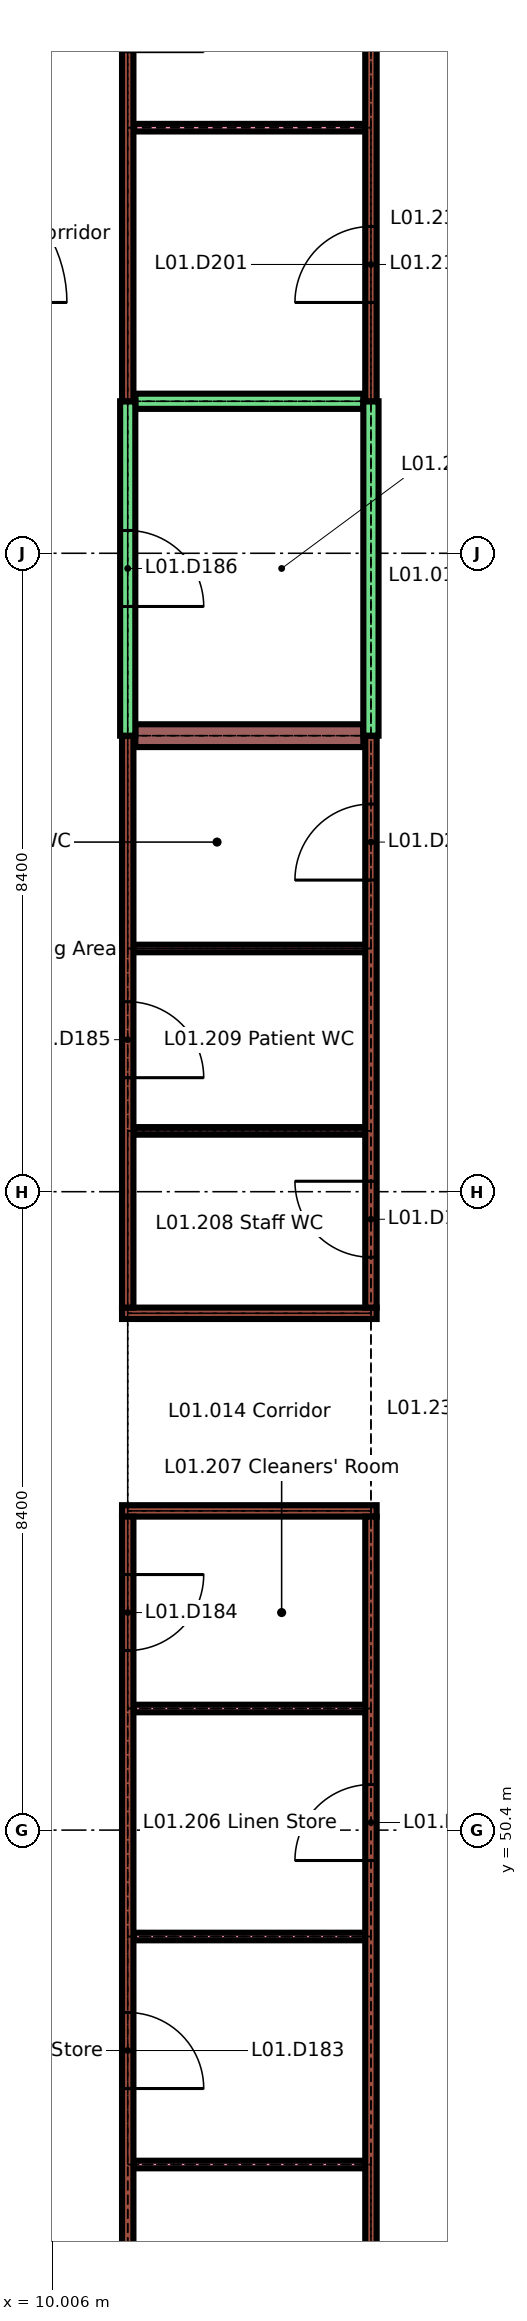
"""IFC4 building model, lengths in metres.
Left out: names, types, materials, properties, quantities, classifications, styles, units other than length and angle.
Written with IfcOpenShell. Run it as: python <this file> out.ifc"""

import sys

from ifc_helpers import new_model, si_unit, direction, frame, frame_2d, origin, place, context, subcontext, project, spatial, rectangle, extrude, element, fill, save


model = new_model("IFC4")
c1 = context("Model", 3, precision=1e-05, world=origin(), true_north=direction((0.0, 1.0)))
c2 = subcontext(c1, "Body", "Model", "MODEL_VIEW")
j1 = project(units=[si_unit("LENGTHUNIT", "METRE"), si_unit("PLANEANGLEUNIT", "RADIAN")], contexts=[c1])
p1 = place(None, origin())
s1 = spatial("IfcSite", under=j1, at=p1, CompositionType="ELEMENT")
p2 = place(p1, origin())
s2 = spatial("IfcBuilding", under=s1, at=p2, CompositionType="ELEMENT")
p3 = place(p2, frame((0.0, 0.0, 4.5)))
s3 = spatial("IfcBuildingStorey", under=s2, at=p3, CompositionType="ELEMENT", Elevation=4.5)
for number, where, z_axis, x_axis in (
    (1, (11.075, 46.0, 0.0), (0.0, 0.0, 1.0), (1.0, 0.0, 0.0)),
    (2, (11.075, 49.0, 0.0), (0.0, 0.0, 1.0), (1.0, 0.0, 0.0)),
    (3, (11.075, 52.0, 0.0), (0.0, 0.0, 1.0), (1.0, 0.0, 0.0)),
):
    element("IfcWall", number, at=place(p3, frame(where, z_axis=z_axis, x_axis=x_axis)), inside=s3, PredefinedType="PARTITIONING", context=c2, shape_type="SweptSolid", body=[
        extrude(rectangle(XDim=3.05, YDim=0.1, at=frame_2d((1.525, 0.0))), origin(), (0.0, 0.0, 1.0), 3.45),
    ])
for number, where, z_axis, x_axis in (
    (4, (10.925, 54.6, 0.0), (0.0, 0.0, 1.0), (1.0, 0.0, 0.0)),
    (5, (10.925, 57.2, 0.0), (0.0, 0.0, 1.0), (1.0, 0.0, 0.0)),
):
    element("IfcWall", number, at=place(p3, frame(where, z_axis=z_axis, x_axis=x_axis)), inside=s3, PredefinedType="PARTITIONING", context=c2, shape_type="SweptSolid", body=[
        extrude(rectangle(XDim=3.35, YDim=0.15, at=frame_2d((1.675, 0.0))), origin(), (0.0, 0.0, 1.0), 3.45),
    ])
for number, where, z_axis, x_axis in (
    (6, (11.075, 59.6, 0.0), (0.0, 0.0, 1.0), (1.0, 0.0, 0.0)),
    (7, (11.075, 62.0, 0.0), (0.0, 0.0, 1.0), (1.0, 0.0, 0.0)),
):
    element("IfcWall", number, at=place(p3, frame(where, z_axis=z_axis, x_axis=x_axis)), inside=s3, PredefinedType="PARTITIONING", context=c2, shape_type="SweptSolid", body=[
        extrude(rectangle(XDim=3.05, YDim=0.1, at=frame_2d((1.525, 0.0))), origin(), (0.0, 0.0, 1.0), 3.45),
    ])
p4 = place(p3, frame((11.1, 64.8, 0.0), z_axis=(0.0, 0.0, 1.0), x_axis=(1.0, 0.0, 0.0)))
e8 = element("IfcWall", 8, at=p4, inside=s3, PredefinedType="SOLIDWALL", context=c2, shape_type="SweptSolid", body=[
    extrude(rectangle(XDim=3.0, YDim=0.3, at=frame_2d((1.5, 0.0))), origin(), (0.0, 0.0, 1.0), 3.45),
])
p5 = place(p3, frame((11.1, 69.2, 0.0), z_axis=(0.0, 0.0, 1.0), x_axis=(1.0, 0.0, 0.0)))
e9 = element("IfcWall", 9, at=p5, inside=s3, PredefinedType="SOLIDWALL", context=c2, shape_type="SweptSolid", body=[
    extrude(rectangle(XDim=3.0, YDim=0.2, at=frame_2d((1.5, 0.0))), origin(), (0.0, 0.0, 1.0), 3.45),
])
p6 = place(p3, frame((11.075, 72.8, 0.0), z_axis=(0.0, 0.0, 1.0), x_axis=(1.0, 0.0, 0.0)))
e10 = element("IfcWall", 10, at=p6, inside=s3, PredefinedType="PARTITIONING", context=c2, shape_type="SweptSolid", body=[
    extrude(rectangle(XDim=3.05, YDim=0.1, at=frame_2d((1.525, 0.0))), origin(), (0.0, 0.0, 1.0), 3.45),
])
p7 = place(p3, frame((11.0, 27.875, 0.0), z_axis=(0.0, 0.0, 1.0), x_axis=(0.0, 1.0, 0.0)))
e11 = element("IfcWall", 11, at=p7, inside=s3, PredefinedType="PARTITIONING", context=c2, shape_type="SweptSolid", body=[
    extrude(rectangle(XDim=26.65, YDim=0.15, at=frame_2d((13.325, 0.0))), origin(), (0.0, 0.0, 1.0), 3.45),
])
p8 = place(p7, frame((0.663, 0.0, 0.0)))
e12 = element("IfcOpeningElement", 12, at=p8, cuts=e11, PredefinedType="OPENING", context=c2, shape_type="SweptSolid", body=[
    extrude(rectangle(XDim=1.0, YDim=2.1, at=frame_2d((0.5, 1.05))), frame((0.0, 0.085, 0.0), z_axis=(0.0, -1.0, 0.0), x_axis=(1.0, 0.0, 0.0)), (0.0, 0.0, 1.0), 0.17),
])
p9 = place(p7, frame((5.825, 0.0, 0.0)))
e13 = element("IfcOpeningElement", 13, at=p9, cuts=e11, PredefinedType="OPENING", context=c2, shape_type="SweptSolid", body=[
    extrude(rectangle(XDim=1.0, YDim=2.1, at=frame_2d((0.5, 1.05))), frame((0.0, 0.085, 0.0), z_axis=(0.0, -1.0, 0.0), x_axis=(1.0, 0.0, 0.0)), (0.0, 0.0, 1.0), 0.17),
])
p10 = place(p7, frame((12.125, 0.0, 0.0)))
e14 = element("IfcOpeningElement", 14, at=p10, cuts=e11, PredefinedType="OPENING", context=c2, shape_type="SweptSolid", body=[
    extrude(rectangle(XDim=1.0, YDim=2.1, at=frame_2d((0.5, 1.05))), frame((0.0, 0.085, 0.0), z_axis=(0.0, -1.0, 0.0), x_axis=(1.0, 0.0, 0.0)), (0.0, 0.0, 1.0), 0.17),
])
p11 = place(p7, frame((19.125, 0.0, 0.0)))
e15 = element("IfcOpeningElement", 15, at=p11, cuts=e11, PredefinedType="OPENING", context=c2, shape_type="SweptSolid", body=[
    extrude(rectangle(XDim=1.0, YDim=2.1, at=frame_2d((0.5, 1.05))), frame((0.0, 0.085, 0.0), z_axis=(0.0, -1.0, 0.0), x_axis=(1.0, 0.0, 0.0)), (0.0, 0.0, 1.0), 0.17),
])
p12 = place(p7, frame((24.887, 0.0, 0.0)))
e16 = element("IfcOpeningElement", 16, at=p12, cuts=e11, PredefinedType="OPENING", context=c2, shape_type="SweptSolid", body=[
    extrude(rectangle(XDim=1.0, YDim=2.1, at=frame_2d((0.5, 1.05))), frame((0.0, 0.085, 0.0), z_axis=(0.0, -1.0, 0.0), x_axis=(1.0, 0.0, 0.0)), (0.0, 0.0, 1.0), 0.17),
])
p13 = place(p3, frame((11.0, 57.275, 0.0), z_axis=(0.0, 0.0, 1.0), x_axis=(0.0, 1.0, 0.0)))
e17 = element("IfcWall", 17, at=p13, inside=s3, PredefinedType="PARTITIONING", context=c2, shape_type="SweptSolid", body=[
    extrude(rectangle(XDim=7.525, YDim=0.15, at=frame_2d((3.763, 0.0))), origin(), (0.0, 0.0, 1.0), 3.45),
])
p14 = place(p13, frame((3.025, 0.0, 0.0)))
e18 = element("IfcOpeningElement", 18, at=p14, cuts=e17, PredefinedType="OPENING", context=c2, shape_type="SweptSolid", body=[
    extrude(rectangle(XDim=1.0, YDim=2.1, at=frame_2d((0.5, 1.05))), frame((0.0, 0.085, 0.0), z_axis=(0.0, -1.0, 0.0), x_axis=(1.0, 0.0, 0.0)), (0.0, 0.0, 1.0), 0.17),
])
p15 = place(p3, frame((11.0, 64.8, 0.0), z_axis=(0.0, 0.0, 1.0), x_axis=(0.0, 1.0, 0.0)))
e19 = element("IfcWall", 19, at=p15, inside=s3, PredefinedType="SOLIDWALL", context=c2, shape_type="SweptSolid", body=[
    extrude(rectangle(XDim=4.4, YDim=0.2, at=frame_2d((2.2, 0.0))), origin(), (0.0, 0.0, 1.0), 3.45),
])
p16 = place(p15, frame((1.7, 0.0, 0.0)))
e20 = element("IfcOpeningElement", 20, at=p16, cuts=e19, PredefinedType="OPENING", context=c2, shape_type="SweptSolid", body=[
    extrude(rectangle(XDim=1.0, YDim=2.1, at=frame_2d((0.5, 1.05))), frame((0.0, 0.11, 0.0), z_axis=(0.0, -1.0, 0.0), x_axis=(1.0, 0.0, 0.0)), (0.0, 0.0, 1.0), 0.22),
])
p17 = place(p3, frame((11.0, 69.2, 0.0), z_axis=(0.0, 0.0, 1.0), x_axis=(0.0, 1.0, 0.0)))
e21 = element("IfcWall", 21, at=p17, inside=s3, PredefinedType="PARTITIONING", context=c2, shape_type="SweptSolid", body=[
    extrude(rectangle(XDim=14.725, YDim=0.15, at=frame_2d((7.363, 0.0))), origin(), (0.0, 0.0, 1.0), 3.45),
])
p18 = place(p17, frame((4.6, 0.0, 0.0)))
e22 = element("IfcOpeningElement", 22, at=p18, cuts=e21, PredefinedType="OPENING", context=c2, shape_type="SweptSolid", body=[
    extrude(rectangle(XDim=1.0, YDim=2.1, at=frame_2d((0.5, 1.05))), frame((0.0, 0.085, 0.0), z_axis=(0.0, -1.0, 0.0), x_axis=(1.0, 0.0, 0.0)), (0.0, 0.0, 1.0), 0.17),
])
p19 = place(p17, frame((11.663, 0.0, 0.0)))
e23 = element("IfcOpeningElement", 23, at=p19, cuts=e21, PredefinedType="OPENING", context=c2, shape_type="SweptSolid", body=[
    extrude(rectangle(XDim=1.0, YDim=2.1, at=frame_2d((0.5, 1.05))), frame((0.0, 0.085, 0.0), z_axis=(0.0, -1.0, 0.0), x_axis=(1.0, 0.0, 0.0)), (0.0, 0.0, 1.0), 0.17),
])
p20 = place(p3, frame((14.2, 27.875, 0.0), z_axis=(0.0, 0.0, 1.0), x_axis=(0.0, 1.0, 0.0)))
e24 = element("IfcWall", 24, at=p20, inside=s3, PredefinedType="PARTITIONING", context=c2, shape_type="SweptSolid", body=[
    extrude(rectangle(XDim=26.65, YDim=0.15, at=frame_2d((13.325, 0.0))), origin(), (0.0, 0.0, 1.0), 3.45),
])
p21 = place(p20, frame((3.225, 0.0, 0.0)))
e25 = element("IfcOpeningElement", 25, at=p21, cuts=e24, PredefinedType="OPENING", context=c2, shape_type="SweptSolid", body=[
    extrude(rectangle(XDim=1.0, YDim=2.1, at=frame_2d((0.5, 1.05))), frame((0.0, 0.085, 0.0), z_axis=(0.0, -1.0, 0.0), x_axis=(1.0, 0.0, 0.0)), (0.0, 0.0, 1.0), 0.17),
])
p22 = place(p20, frame((8.825, 0.0, 0.0)))
e26 = element("IfcOpeningElement", 26, at=p22, cuts=e24, PredefinedType="OPENING", context=c2, shape_type="SweptSolid", body=[
    extrude(rectangle(XDim=1.0, YDim=2.1, at=frame_2d((0.5, 1.05))), frame((0.0, 0.085, 0.0), z_axis=(0.0, -1.0, 0.0), x_axis=(1.0, 0.0, 0.0)), (0.0, 0.0, 1.0), 0.17),
])
p23 = place(p20, frame((15.625, 0.0, 0.0)))
e27 = element("IfcOpeningElement", 27, at=p23, cuts=e24, PredefinedType="OPENING", context=c2, shape_type="SweptSolid", body=[
    extrude(rectangle(XDim=1.0, YDim=2.1, at=frame_2d((0.5, 1.05))), frame((0.0, 0.085, 0.0), z_axis=(0.0, -1.0, 0.0), x_axis=(1.0, 0.0, 0.0)), (0.0, 0.0, 1.0), 0.17),
])
p24 = place(p20, frame((22.125, 0.0, 0.0)))
e28 = element("IfcOpeningElement", 28, at=p24, cuts=e24, PredefinedType="OPENING", context=c2, shape_type="SweptSolid", body=[
    extrude(rectangle(XDim=1.0, YDim=2.1, at=frame_2d((0.5, 1.05))), frame((0.0, 0.085, 0.0), z_axis=(0.0, -1.0, 0.0), x_axis=(1.0, 0.0, 0.0)), (0.0, 0.0, 1.0), 0.17),
])
p25 = place(p3, frame((14.2, 57.275, 0.0), z_axis=(0.0, 0.0, 1.0), x_axis=(0.0, 1.0, 0.0)))
e29 = element("IfcWall", 29, at=p25, inside=s3, PredefinedType="PARTITIONING", context=c2, shape_type="SweptSolid", body=[
    extrude(rectangle(XDim=7.525, YDim=0.15, at=frame_2d((3.763, 0.0))), origin(), (0.0, 0.0, 1.0), 3.45),
])
p26 = place(p25, frame((0.663, 0.0, 0.0)))
e30 = element("IfcOpeningElement", 30, at=p26, cuts=e29, PredefinedType="OPENING", context=c2, shape_type="SweptSolid", body=[
    extrude(rectangle(XDim=1.0, YDim=2.1, at=frame_2d((0.5, 1.05))), frame((0.0, 0.085, 0.0), z_axis=(0.0, -1.0, 0.0), x_axis=(1.0, 0.0, 0.0)), (0.0, 0.0, 1.0), 0.17),
])
p27 = place(p25, frame((5.625, 0.0, 0.0)))
e31 = element("IfcOpeningElement", 31, at=p27, cuts=e29, PredefinedType="OPENING", context=c2, shape_type="SweptSolid", body=[
    extrude(rectangle(XDim=1.0, YDim=2.1, at=frame_2d((0.5, 1.05))), frame((0.0, 0.085, 0.0), z_axis=(0.0, -1.0, 0.0), x_axis=(1.0, 0.0, 0.0)), (0.0, 0.0, 1.0), 0.17),
])
p28 = place(p3, frame((14.2, 64.8, 0.0), z_axis=(0.0, 0.0, 1.0), x_axis=(0.0, 1.0, 0.0)))
e32 = element("IfcWall", 32, at=p28, inside=s3, PredefinedType="SOLIDWALL", context=c2, shape_type="SweptSolid", body=[
    extrude(rectangle(XDim=4.4, YDim=0.2, at=frame_2d((2.2, 0.0))), origin(), (0.0, 0.0, 1.0), 3.45),
])
p29 = place(p3, frame((14.2, 69.2, 0.0), z_axis=(0.0, 0.0, 1.0), x_axis=(0.0, 1.0, 0.0)))
e33 = element("IfcWall", 33, at=p29, inside=s3, PredefinedType="PARTITIONING", context=c2, shape_type="SweptSolid", body=[
    extrude(rectangle(XDim=14.725, YDim=0.15, at=frame_2d((7.363, 0.0))), origin(), (0.0, 0.0, 1.0), 3.45),
])
p30 = place(p29, frame((1.3, 0.0, 0.0)))
e34 = element("IfcOpeningElement", 34, at=p30, cuts=e33, PredefinedType="OPENING", context=c2, shape_type="SweptSolid", body=[
    extrude(rectangle(XDim=1.0, YDim=2.1, at=frame_2d((0.5, 1.05))), frame((0.0, 0.085, 0.0), z_axis=(0.0, -1.0, 0.0), x_axis=(1.0, 0.0, 0.0)), (0.0, 0.0, 1.0), 0.17),
])
p31 = place(p29, frame((7.6, 0.0, 0.0)))
e35 = element("IfcOpeningElement", 35, at=p31, cuts=e33, PredefinedType="OPENING", context=c2, shape_type="SweptSolid", body=[
    extrude(rectangle(XDim=1.0, YDim=2.1, at=frame_2d((0.5, 1.05))), frame((0.0, 0.085, 0.0), z_axis=(0.0, -1.0, 0.0), x_axis=(1.0, 0.0, 0.0)), (0.0, 0.0, 1.0), 0.17),
])
p32 = place(p11, origin())
e36 = element("IfcDoor", 36, at=p32, inside=s3, OperationType="SINGLE_SWING_LEFT", PredefinedType="DOOR", context=c2, shape_type="SweptSolid", body=[
    extrude(rectangle(XDim=1.0, YDim=2.1, at=frame_2d((0.5, 1.05))), frame((0.0, 0.025, 0.0), z_axis=(0.0, -1.0, 0.0), x_axis=(1.0, 0.0, 0.0)), (0.0, 0.0, 1.0), 0.05),
])
fill(e15, e36)
p33 = place(p12, origin())
e37 = element("IfcDoor", 37, at=p33, inside=s3, OperationType="SINGLE_SWING_RIGHT", PredefinedType="DOOR", context=c2, shape_type="SweptSolid", body=[
    extrude(rectangle(XDim=1.0, YDim=2.1, at=frame_2d((0.5, 1.05))), frame((0.0, 0.025, 0.0), z_axis=(0.0, -1.0, 0.0), x_axis=(1.0, 0.0, 0.0)), (0.0, 0.0, 1.0), 0.05),
])
fill(e16, e37)
p34 = place(p14, origin())
e38 = element("IfcDoor", 38, at=p34, inside=s3, OperationType="SINGLE_SWING_LEFT", PredefinedType="DOOR", context=c2, shape_type="SweptSolid", body=[
    extrude(rectangle(XDim=1.0, YDim=2.1, at=frame_2d((0.5, 1.05))), frame((0.0, 0.025, 0.0), z_axis=(0.0, -1.0, 0.0), x_axis=(1.0, 0.0, 0.0)), (0.0, 0.0, 1.0), 0.05),
])
fill(e18, e38)
p35 = place(p16, origin())
e39 = element("IfcDoor", 39, at=p35, inside=s3, OperationType="SINGLE_SWING_LEFT", PredefinedType="DOOR", context=c2, shape_type="SweptSolid", body=[
    extrude(rectangle(XDim=1.0, YDim=2.1, at=frame_2d((0.5, 1.05))), frame((0.0, 0.025, 0.0), z_axis=(0.0, -1.0, 0.0), x_axis=(1.0, 0.0, 0.0)), (0.0, 0.0, 1.0), 0.05),
])
fill(e20, e39)
p36 = place(p24, origin())
e40 = element("IfcDoor", 40, at=p36, inside=s3, OperationType="SINGLE_SWING_RIGHT", PredefinedType="DOOR", context=c2, shape_type="SweptSolid", body=[
    extrude(rectangle(XDim=1.0, YDim=2.1, at=frame_2d((0.5, 1.05))), frame((0.0, 0.025, 0.0), z_axis=(0.0, -1.0, 0.0), x_axis=(1.0, 0.0, 0.0)), (0.0, 0.0, 1.0), 0.05),
])
fill(e28, e40)
p37 = place(p26, origin())
e41 = element("IfcDoor", 41, at=p37, inside=s3, OperationType="SINGLE_SWING_LEFT", PredefinedType="DOOR", context=c2, shape_type="SweptSolid", body=[
    extrude(rectangle(XDim=1.0, YDim=2.1, at=frame_2d((0.5, 1.05))), frame((0.0, 0.025, 0.0), z_axis=(0.0, -1.0, 0.0), x_axis=(1.0, 0.0, 0.0)), (0.0, 0.0, 1.0), 0.05),
])
fill(e30, e41)
p38 = place(p27, origin())
e42 = element("IfcDoor", 42, at=p38, inside=s3, OperationType="SINGLE_SWING_RIGHT", PredefinedType="DOOR", context=c2, shape_type="SweptSolid", body=[
    extrude(rectangle(XDim=1.0, YDim=2.1, at=frame_2d((0.5, 1.05))), frame((0.0, 0.025, 0.0), z_axis=(0.0, -1.0, 0.0), x_axis=(1.0, 0.0, 0.0)), (0.0, 0.0, 1.0), 0.05),
])
fill(e31, e42)
p39 = place(p30, origin())
e43 = element("IfcDoor", 43, at=p39, inside=s3, OperationType="SINGLE_SWING_RIGHT", PredefinedType="DOOR", context=c2, shape_type="SweptSolid", body=[
    extrude(rectangle(XDim=1.0, YDim=2.1, at=frame_2d((0.5, 1.05))), frame((0.0, 0.025, 0.0), z_axis=(0.0, -1.0, 0.0), x_axis=(1.0, 0.0, 0.0)), (0.0, 0.0, 1.0), 0.05),
])
fill(e34, e43)
save(model, sys.argv[1])
